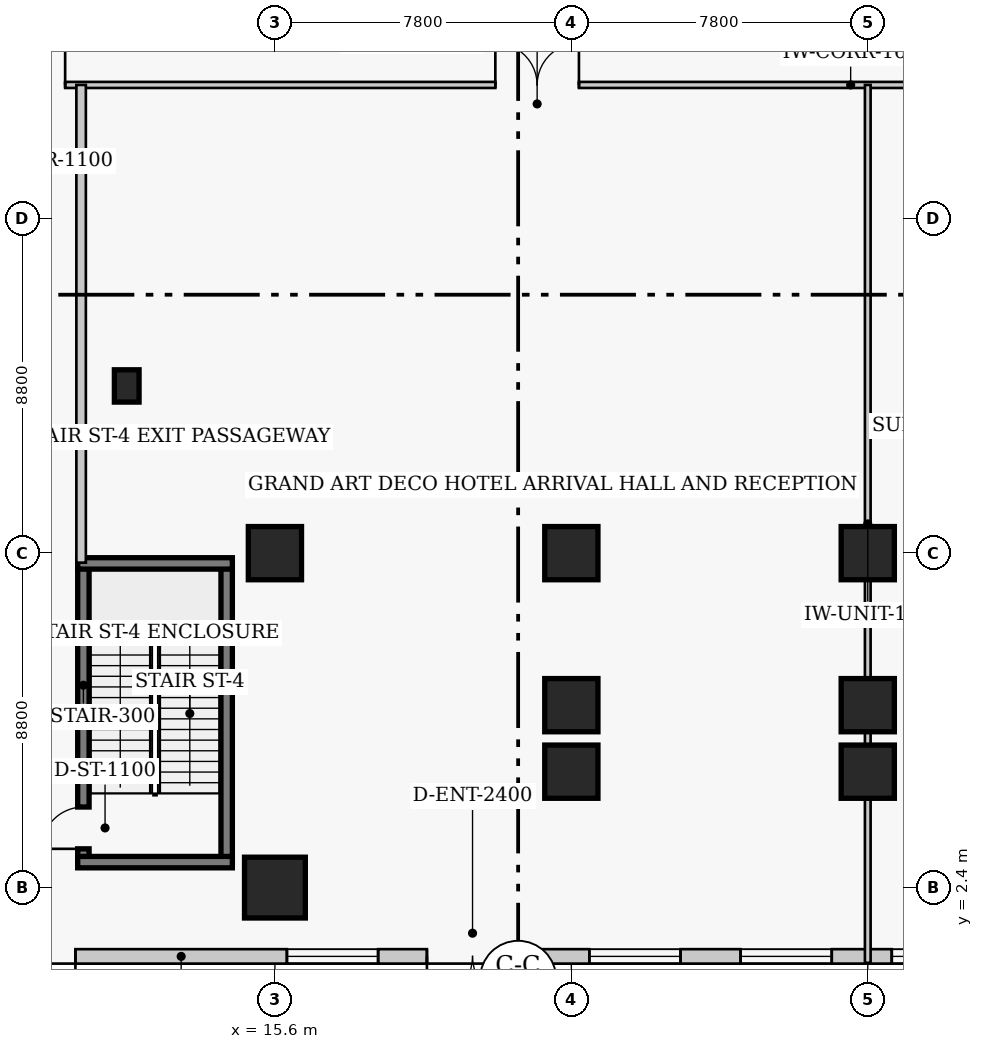
"""IFC4 building model, lengths in metres.
Left out: names, types, materials, properties, quantities, classifications, styles, units other than length and angle.
Written with IfcOpenShell. Run it as: python <this file> out.ifc"""

import sys

from ifc_helpers import new_model, si_unit, direction, frame, frame_2d, origin, origin_2d, place, context, subcontext, project, spatial, rectangle, extrude, element, fill, save


model = new_model("IFC4")
c1 = context("Model", 3, precision=1e-05, world=origin(), true_north=direction((0.0, 1.0)))
c2 = subcontext(c1, "Body", "Model", "MODEL_VIEW")
j1 = project(units=[si_unit("LENGTHUNIT", "METRE"), si_unit("PLANEANGLEUNIT", "RADIAN")], contexts=[c1])
p1 = place(None, origin())
s1 = spatial("IfcSite", under=j1, at=p1, CompositionType="ELEMENT")
p2 = place(p1, origin())
s2 = spatial("IfcBuilding", under=s1, at=p2, CompositionType="ELEMENT")
p3 = place(p2, origin())
s3 = spatial("IfcBuildingStorey", under=s2, at=p3, CompositionType="ELEMENT", Elevation=0.0)
p4 = place(p3, frame((10.56, 3.07, 0.0), z_axis=(0.0, 0.0, 1.0), x_axis=(0.0, 1.0, 0.0)))
e1 = element("IfcWall", 1, at=p4, inside=s3, PredefinedType="SHEAR", context=c2, shape_type="SweptSolid", body=[
    extrude(rectangle(XDim=7.86, YDim=0.3, at=frame_2d((3.93, 0.0))), origin(), (0.0, 0.0, 1.0), 5.4),
])
p5 = place(p4, frame((0.35, 0.0, 0.0)))
e2 = element("IfcOpeningElement", 2, at=p5, cuts=e1, PredefinedType="OPENING", context=c2, shape_type="SweptSolid", body=[
    extrude(rectangle(XDim=1.1, YDim=2.15, at=frame_2d((0.55, 1.075))), frame((0.0, 0.16, 0.0), z_axis=(0.0, -1.0, 0.0), x_axis=(1.0, 0.0, 0.0)), (0.0, 0.0, 1.0), 0.32),
])
p6 = place(p3, frame((14.33, 3.07, 0.0), z_axis=(0.0, 0.0, 1.0), x_axis=(0.0, 1.0, 0.0)))
e3 = element("IfcWall", 3, at=p6, inside=s3, PredefinedType="SHEAR", context=c2, shape_type="SweptSolid", body=[
    extrude(rectangle(XDim=7.86, YDim=0.3, at=frame_2d((3.93, 0.0))), origin(), (0.0, 0.0, 1.0), 5.4),
])
for number, where, z_axis, x_axis in (
    (4, (10.41, 10.93, 0.0), (0.0, 0.0, 1.0), (1.0, 0.0, 0.0)),
    (5, (10.41, 3.07, 0.0), (0.0, 0.0, 1.0), (1.0, 0.0, 0.0)),
):
    element("IfcWall", number, at=place(p3, frame(where, z_axis=z_axis, x_axis=x_axis)), inside=s3, PredefinedType="SHEAR", context=c2, shape_type="SweptSolid", body=[
        extrude(rectangle(XDim=4.07, YDim=0.3, at=frame_2d((2.035, 0.0))), origin(), (0.0, 0.0, 1.0), 5.4),
    ])
p7 = place(p3, frame((15.6, 2.4, 0.0), z_axis=(0.0, 0.0, 1.0), x_axis=(1.0, 0.0, 0.0)))
e6 = element("IfcColumn", 6, at=p7, inside=s3, PredefinedType="COLUMN", context=c2, shape_type="SweptSolid", body=[
    extrude(rectangle(XDim=1.6, YDim=1.6, at=origin_2d()), origin(), (0.0, 0.0, 1.0), 5.4),
])
for number, where, z_axis, x_axis in (
    (7, (15.6, 11.2, 0.0), (0.0, 0.0, 1.0), (1.0, 0.0, 0.0)),
    (8, (23.4, 11.2, 0.0), (0.0, 0.0, 1.0), (1.0, 0.0, 0.0)),
    (9, (31.2, 11.2, 0.0), (0.0, 0.0, 1.0), (1.0, 0.0, 0.0)),
    (10, (23.4, 7.2, 0.0), (0.0, 0.0, 1.0), (1.0, 0.0, 0.0)),
    (11, (31.2, 7.2, 0.0), (0.0, 0.0, 1.0), (1.0, 0.0, 0.0)),
    (12, (23.4, 5.45, 0.0), (0.0, 0.0, 1.0), (1.0, 0.0, 0.0)),
    (13, (31.2, 5.45, 0.0), (0.0, 0.0, 1.0), (1.0, 0.0, 0.0)),
):
    element("IfcColumn", number, at=place(p3, frame(where, z_axis=z_axis, x_axis=x_axis)), inside=s3, PredefinedType="COLUMN", context=c2, shape_type="SweptSolid", body=[
        extrude(rectangle(XDim=1.4, YDim=1.4, at=origin_2d()), origin(), (0.0, 0.0, 1.0), 5.4),
    ])
p8 = place(p3, frame((11.7, 15.6, 0.0), z_axis=(0.0, 0.0, 1.0), x_axis=(1.0, 0.0, 0.0)))
e14 = element("IfcColumn", 14, at=p8, inside=s3, PredefinedType="PILASTER", context=c2, shape_type="SweptSolid", body=[
    extrude(rectangle(XDim=0.65, YDim=0.85, at=origin_2d()), origin(), (0.0, 0.0, 1.0), 5.4),
])
p9 = place(p3, frame((78.79, 0.59, 0.0), z_axis=(0.0, 0.0, 1.0), x_axis=(-1.0, 0.0, 0.0)))
e15 = element("IfcWall", 15, at=p9, inside=s3, PredefinedType="SOLIDWALL", context=c2, shape_type="SweptSolid", body=[
    extrude(rectangle(XDim=79.58, YDim=0.38, at=frame_2d((39.79, 0.0))), origin(), (0.0, 0.0, 1.0), 5.1),
])
p10 = place(p9, frame((68.44, 0.0, 0.0)))
e16 = element("IfcOpeningElement", 16, at=p10, cuts=e15, PredefinedType="OPENING", context=c2, shape_type="SweptSolid", body=[
    extrude(rectangle(XDim=1.6, YDim=2.2, at=frame_2d((0.8, 1.1))), frame((0.0, 0.2, 0.0), z_axis=(0.0, -1.0, 0.0), x_axis=(1.0, 0.0, 0.0)), (0.0, 0.0, 1.0), 0.4),
])
p11 = place(p9, frame((56.79, 0.0, 0.0)))
e17 = element("IfcOpeningElement", 17, at=p11, cuts=e15, PredefinedType="OPENING", context=c2, shape_type="SweptSolid", body=[
    extrude(rectangle(XDim=2.4, YDim=2.55, at=frame_2d((1.2, 1.275))), frame((0.0, 0.2, 0.0), z_axis=(0.0, -1.0, 0.0), x_axis=(1.0, 0.0, 0.0)), (0.0, 0.0, 1.0), 0.4),
])
p12 = place(p9, frame((38.59, 0.0, 0.0)))
e18 = element("IfcOpeningElement", 18, at=p12, cuts=e15, PredefinedType="OPENING", context=c2, shape_type="SweptSolid", body=[
    extrude(rectangle(XDim=2.4, YDim=2.55, at=frame_2d((1.2, 1.275))), frame((0.0, 0.2, 0.0), z_axis=(0.0, -1.0, 0.0), x_axis=(1.0, 0.0, 0.0)), (0.0, 0.0, 1.0), 0.4),
])
p13 = place(p9, frame((19.49, 0.0, 0.0)))
e19 = element("IfcOpeningElement", 19, at=p13, cuts=e15, PredefinedType="OPENING", context=c2, shape_type="SweptSolid", body=[
    extrude(rectangle(XDim=1.6, YDim=2.2, at=frame_2d((0.8, 1.1))), frame((0.0, 0.2, 0.0), z_axis=(0.0, -1.0, 0.0), x_axis=(1.0, 0.0, 0.0)), (0.0, 0.0, 1.0), 0.4),
])
p14 = place(p9, frame((1.439, 0.0, 0.75)))
e20 = element("IfcOpeningElement", 20, at=p14, cuts=e15, PredefinedType="OPENING", context=c2, shape_type="SweptSolid", body=[
    extrude(rectangle(XDim=2.4, YDim=2.2, at=frame_2d((1.2, 1.1))), frame((0.0, 0.2, 0.0), z_axis=(0.0, -1.0, 0.0), x_axis=(1.0, 0.0, 0.0)), (0.0, 0.0, 1.0), 0.4),
])
p15 = place(p9, frame((4.769, 0.0, 0.75)))
e21 = element("IfcOpeningElement", 21, at=p15, cuts=e15, PredefinedType="OPENING", context=c2, shape_type="SweptSolid", body=[
    extrude(rectangle(XDim=2.4, YDim=2.2, at=frame_2d((1.2, 1.1))), frame((0.0, 0.2, 0.0), z_axis=(0.0, -1.0, 0.0), x_axis=(1.0, 0.0, 0.0)), (0.0, 0.0, 1.0), 0.4),
])
p16 = place(p9, frame((8.748, 0.0, 0.75)))
e22 = element("IfcOpeningElement", 22, at=p16, cuts=e15, PredefinedType="OPENING", context=c2, shape_type="SweptSolid", body=[
    extrude(rectangle(XDim=2.4, YDim=2.2, at=frame_2d((1.2, 1.1))), frame((0.0, 0.2, 0.0), z_axis=(0.0, -1.0, 0.0), x_axis=(1.0, 0.0, 0.0)), (0.0, 0.0, 1.0), 0.4),
])
p17 = place(p9, frame((12.727, 0.0, 0.75)))
e23 = element("IfcOpeningElement", 23, at=p17, cuts=e15, PredefinedType="OPENING", context=c2, shape_type="SweptSolid", body=[
    extrude(rectangle(XDim=2.4, YDim=2.2, at=frame_2d((1.2, 1.1))), frame((0.0, 0.2, 0.0), z_axis=(0.0, -1.0, 0.0), x_axis=(1.0, 0.0, 0.0)), (0.0, 0.0, 1.0), 0.4),
])
p18 = place(p9, frame((24.664, 0.0, 0.75)))
e24 = element("IfcOpeningElement", 24, at=p18, cuts=e15, PredefinedType="OPENING", context=c2, shape_type="SweptSolid", body=[
    extrude(rectangle(XDim=2.4, YDim=2.2, at=frame_2d((1.2, 1.1))), frame((0.0, 0.2, 0.0), z_axis=(0.0, -1.0, 0.0), x_axis=(1.0, 0.0, 0.0)), (0.0, 0.0, 1.0), 0.4),
])
p19 = place(p9, frame((28.643, 0.0, 0.75)))
e25 = element("IfcOpeningElement", 25, at=p19, cuts=e15, PredefinedType="OPENING", context=c2, shape_type="SweptSolid", body=[
    extrude(rectangle(XDim=2.4, YDim=2.2, at=frame_2d((1.2, 1.1))), frame((0.0, 0.2, 0.0), z_axis=(0.0, -1.0, 0.0), x_axis=(1.0, 0.0, 0.0)), (0.0, 0.0, 1.0), 0.4),
])
p20 = place(p9, frame((32.622, 0.0, 0.75)))
e26 = element("IfcOpeningElement", 26, at=p20, cuts=e15, PredefinedType="OPENING", context=c2, shape_type="SweptSolid", body=[
    extrude(rectangle(XDim=2.4, YDim=2.2, at=frame_2d((1.2, 1.1))), frame((0.0, 0.2, 0.0), z_axis=(0.0, -1.0, 0.0), x_axis=(1.0, 0.0, 0.0)), (0.0, 0.0, 1.0), 0.4),
])
p21 = place(p9, frame((44.559, 0.0, 0.75)))
e27 = element("IfcOpeningElement", 27, at=p21, cuts=e15, PredefinedType="OPENING", context=c2, shape_type="SweptSolid", body=[
    extrude(rectangle(XDim=2.4, YDim=2.2, at=frame_2d((1.2, 1.1))), frame((0.0, 0.2, 0.0), z_axis=(0.0, -1.0, 0.0), x_axis=(1.0, 0.0, 0.0)), (0.0, 0.0, 1.0), 0.4),
])
p22 = place(p9, frame((48.538, 0.0, 0.75)))
e28 = element("IfcOpeningElement", 28, at=p22, cuts=e15, PredefinedType="OPENING", context=c2, shape_type="SweptSolid", body=[
    extrude(rectangle(XDim=2.4, YDim=2.2, at=frame_2d((1.2, 1.1))), frame((0.0, 0.2, 0.0), z_axis=(0.0, -1.0, 0.0), x_axis=(1.0, 0.0, 0.0)), (0.0, 0.0, 1.0), 0.4),
])
p23 = place(p9, frame((52.517, 0.0, 0.75)))
e29 = element("IfcOpeningElement", 29, at=p23, cuts=e15, PredefinedType="OPENING", context=c2, shape_type="SweptSolid", body=[
    extrude(rectangle(XDim=2.4, YDim=2.2, at=frame_2d((1.2, 1.1))), frame((0.0, 0.2, 0.0), z_axis=(0.0, -1.0, 0.0), x_axis=(1.0, 0.0, 0.0)), (0.0, 0.0, 1.0), 0.4),
])
p24 = place(p9, frame((60.475, 0.0, 0.75)))
e30 = element("IfcOpeningElement", 30, at=p24, cuts=e15, PredefinedType="OPENING", context=c2, shape_type="SweptSolid", body=[
    extrude(rectangle(XDim=2.4, YDim=2.2, at=frame_2d((1.2, 1.1))), frame((0.0, 0.2, 0.0), z_axis=(0.0, -1.0, 0.0), x_axis=(1.0, 0.0, 0.0)), (0.0, 0.0, 1.0), 0.4),
])
p25 = place(p9, frame((72.412, 0.0, 0.75)))
e31 = element("IfcOpeningElement", 31, at=p25, cuts=e15, PredefinedType="OPENING", context=c2, shape_type="SweptSolid", body=[
    extrude(rectangle(XDim=2.4, YDim=2.2, at=frame_2d((1.2, 1.1))), frame((0.0, 0.2, 0.0), z_axis=(0.0, -1.0, 0.0), x_axis=(1.0, 0.0, 0.0)), (0.0, 0.0, 1.0), 0.4),
])
p26 = place(p9, frame((75.74, 0.0, 0.75)))
e32 = element("IfcOpeningElement", 32, at=p26, cuts=e15, PredefinedType="OPENING", context=c2, shape_type="SweptSolid", body=[
    extrude(rectangle(XDim=2.4, YDim=2.2, at=frame_2d((1.2, 1.1))), frame((0.0, 0.2, 0.0), z_axis=(0.0, -1.0, 0.0), x_axis=(1.0, 0.0, 0.0)), (0.0, 0.0, 1.0), 0.4),
])
p27 = place(p3, frame((-2.98, 23.52, 0.0), z_axis=(0.0, 0.0, 1.0), x_axis=(1.0, 0.0, 0.0)))
e33 = element("IfcWall", 33, at=p27, inside=s3, PredefinedType="PARTITIONING", context=c2, shape_type="SweptSolid", body=[
    extrude(rectangle(XDim=83.96, YDim=0.16, at=frame_2d((41.98, 0.0))), origin(), (0.0, 0.0, 1.0), 5.1),
])
p28 = place(p27, frame((11.96, 0.0, 0.0)))
e34 = element("IfcOpeningElement", 34, at=p28, cuts=e33, PredefinedType="OPENING", context=c2, shape_type="SweptSolid", body=[
    extrude(rectangle(XDim=1.1, YDim=2.15, at=frame_2d((0.55, 1.075))), frame((0.0, 0.09, 0.0), z_axis=(0.0, -1.0, 0.0), x_axis=(1.0, 0.0, 0.0)), (0.0, 0.0, 1.0), 0.18),
])
p29 = place(p27, frame((6.73, 0.0, 0.0)))
e35 = element("IfcOpeningElement", 35, at=p29, cuts=e33, PredefinedType="OPENING", context=c2, shape_type="SweptSolid", body=[
    extrude(rectangle(XDim=1.8, YDim=2.2, at=frame_2d((0.9, 1.1))), frame((0.0, 0.09, 0.0), z_axis=(0.0, -1.0, 0.0), x_axis=(1.0, 0.0, 0.0)), (0.0, 0.0, 1.0), 0.18),
])
p30 = place(p27, frame((24.38, 0.0, 0.0)))
e36 = element("IfcOpeningElement", 36, at=p30, cuts=e33, PredefinedType="OPENING", context=c2, shape_type="SweptSolid", body=[
    extrude(rectangle(XDim=2.2, YDim=2.4, at=frame_2d((1.1, 1.2))), frame((0.0, 0.09, 0.0), z_axis=(0.0, -1.0, 0.0), x_axis=(1.0, 0.0, 0.0)), (0.0, 0.0, 1.0), 0.18),
])
p31 = place(p27, frame((40.88, 0.0, 0.0)))
e37 = element("IfcOpeningElement", 37, at=p31, cuts=e33, PredefinedType="OPENING", context=c2, shape_type="SweptSolid", body=[
    extrude(rectangle(XDim=2.2, YDim=2.4, at=frame_2d((1.1, 1.2))), frame((0.0, 0.09, 0.0), z_axis=(0.0, -1.0, 0.0), x_axis=(1.0, 0.0, 0.0)), (0.0, 0.0, 1.0), 0.18),
])
p32 = place(p27, frame((56.63, 0.0, 0.0)))
e38 = element("IfcOpeningElement", 38, at=p32, cuts=e33, PredefinedType="OPENING", context=c2, shape_type="SweptSolid", body=[
    extrude(rectangle(XDim=2.2, YDim=2.4, at=frame_2d((1.1, 1.2))), frame((0.0, 0.09, 0.0), z_axis=(0.0, -1.0, 0.0), x_axis=(1.0, 0.0, 0.0)), (0.0, 0.0, 1.0), 0.18),
])
p33 = place(p27, frame((67.14, 0.0, 0.0)))
e39 = element("IfcOpeningElement", 39, at=p33, cuts=e33, PredefinedType="OPENING", context=c2, shape_type="SweptSolid", body=[
    extrude(rectangle(XDim=0.88, YDim=2.05, at=frame_2d((0.44, 1.025))), frame((0.0, 0.09, 0.0), z_axis=(0.0, -1.0, 0.0), x_axis=(1.0, 0.0, 0.0)), (0.0, 0.0, 1.0), 0.18),
])
p34 = place(p27, frame((73.29, 0.0, 0.0)))
e40 = element("IfcOpeningElement", 40, at=p34, cuts=e33, PredefinedType="OPENING", context=c2, shape_type="SweptSolid", body=[
    extrude(rectangle(XDim=0.88, YDim=2.05, at=frame_2d((0.44, 1.025))), frame((0.0, 0.09, 0.0), z_axis=(0.0, -1.0, 0.0), x_axis=(1.0, 0.0, 0.0)), (0.0, 0.0, 1.0), 0.18),
])
p35 = place(p3, frame((10.5, 10.95, 0.0), z_axis=(0.0, 0.0, 1.0), x_axis=(0.0, 1.0, 0.0)))
e41 = element("IfcWall", 41, at=p35, inside=s3, PredefinedType="SOLIDWALL", context=c2, shape_type="SweptSolid", body=[
    extrude(rectangle(XDim=12.57, YDim=0.25, at=frame_2d((6.285, 0.0))), origin(), (0.0, 0.0, 1.0), 5.1),
])
p36 = place(p3, frame((31.2, 0.42, 0.0), z_axis=(0.0, 0.0, 1.0), x_axis=(0.0, 1.0, 0.0)))
e42 = element("IfcWall", 42, at=p36, inside=s3, PredefinedType="PARTITIONING", context=c2, shape_type="SweptSolid", body=[
    extrude(rectangle(XDim=23.1, YDim=0.15, at=frame_2d((11.55, 0.0))), origin(), (0.0, 0.0, 1.0), 4.06),
])
p37 = place(p10, origin())
e43 = element("IfcDoor", 43, at=p37, inside=s3, OperationType="DOUBLE_DOOR_SINGLE_SWING", PredefinedType="DOOR", context=c2, shape_type="SweptSolid", body=[
    extrude(rectangle(XDim=1.6, YDim=2.2, at=frame_2d((0.8, 1.1))), frame((0.0, 0.025, 0.0), z_axis=(0.0, -1.0, 0.0), x_axis=(1.0, 0.0, 0.0)), (0.0, 0.0, 1.0), 0.05),
])
fill(e16, e43)
p38 = place(p11, origin())
e44 = element("IfcDoor", 44, at=p38, inside=s3, OperationType="DOUBLE_DOOR_SINGLE_SWING", PredefinedType="DOOR", context=c2, shape_type="SweptSolid", body=[
    extrude(rectangle(XDim=2.4, YDim=2.55, at=frame_2d((1.2, 1.275))), frame((0.0, 0.025, 0.0), z_axis=(0.0, -1.0, 0.0), x_axis=(1.0, 0.0, 0.0)), (0.0, 0.0, 1.0), 0.05),
])
fill(e17, e44)
p39 = place(p21, origin())
e45 = element("IfcWindow", 45, at=p39, inside=s3, PartitioningType="SINGLE_PANEL", PredefinedType="WINDOW", context=c2, shape_type="SweptSolid", body=[
    extrude(rectangle(XDim=2.4, YDim=2.2, at=frame_2d((1.2, 1.1))), frame((0.0, 0.03, 0.0), z_axis=(0.0, -1.0, 0.0), x_axis=(1.0, 0.0, 0.0)), (0.0, 0.0, 1.0), 0.06),
])
fill(e27, e45)
p40 = place(p22, origin())
e46 = element("IfcWindow", 46, at=p40, inside=s3, PartitioningType="SINGLE_PANEL", PredefinedType="WINDOW", context=c2, shape_type="SweptSolid", body=[
    extrude(rectangle(XDim=2.4, YDim=2.2, at=frame_2d((1.2, 1.1))), frame((0.0, 0.03, 0.0), z_axis=(0.0, -1.0, 0.0), x_axis=(1.0, 0.0, 0.0)), (0.0, 0.0, 1.0), 0.06),
])
fill(e28, e46)
p41 = place(p23, origin())
e47 = element("IfcWindow", 47, at=p41, inside=s3, PartitioningType="SINGLE_PANEL", PredefinedType="WINDOW", context=c2, shape_type="SweptSolid", body=[
    extrude(rectangle(XDim=2.4, YDim=2.2, at=frame_2d((1.2, 1.1))), frame((0.0, 0.03, 0.0), z_axis=(0.0, -1.0, 0.0), x_axis=(1.0, 0.0, 0.0)), (0.0, 0.0, 1.0), 0.06),
])
fill(e29, e47)
p42 = place(p24, origin())
e48 = element("IfcWindow", 48, at=p42, inside=s3, PartitioningType="SINGLE_PANEL", PredefinedType="WINDOW", context=c2, shape_type="SweptSolid", body=[
    extrude(rectangle(XDim=2.4, YDim=2.2, at=frame_2d((1.2, 1.1))), frame((0.0, 0.03, 0.0), z_axis=(0.0, -1.0, 0.0), x_axis=(1.0, 0.0, 0.0)), (0.0, 0.0, 1.0), 0.06),
])
fill(e30, e48)
p43 = place(p28, origin())
e49 = element("IfcDoor", 49, at=p43, inside=s3, OperationType="SINGLE_SWING_RIGHT", PredefinedType="DOOR", context=c2, shape_type="SweptSolid", body=[
    extrude(rectangle(XDim=1.1, YDim=2.15, at=frame_2d((0.55, 1.075))), frame((0.0, 0.025, 0.0), z_axis=(0.0, -1.0, 0.0), x_axis=(1.0, 0.0, 0.0)), (0.0, 0.0, 1.0), 0.05),
])
fill(e34, e49)
p44 = place(p30, origin())
e50 = element("IfcDoor", 50, at=p44, inside=s3, OperationType="DOUBLE_DOOR_SINGLE_SWING", PredefinedType="DOOR", context=c2, shape_type="SweptSolid", body=[
    extrude(rectangle(XDim=2.2, YDim=2.4, at=frame_2d((1.1, 1.2))), frame((0.0, 0.025, 0.0), z_axis=(0.0, -1.0, 0.0), x_axis=(1.0, 0.0, 0.0)), (0.0, 0.0, 1.0), 0.05),
])
fill(e36, e50)
p45 = place(p5, origin())
e51 = element("IfcDoor", 51, at=p45, inside=s3, OperationType="SINGLE_SWING_LEFT", PredefinedType="DOOR", context=c2, shape_type="SweptSolid", body=[
    extrude(rectangle(XDim=1.1, YDim=2.15, at=frame_2d((0.55, 1.075))), frame((0.0, 0.025, 0.0), z_axis=(0.0, -1.0, 0.0), x_axis=(1.0, 0.0, 0.0)), (0.0, 0.0, 1.0), 0.05),
])
fill(e2, e51)
save(model, sys.argv[1])
